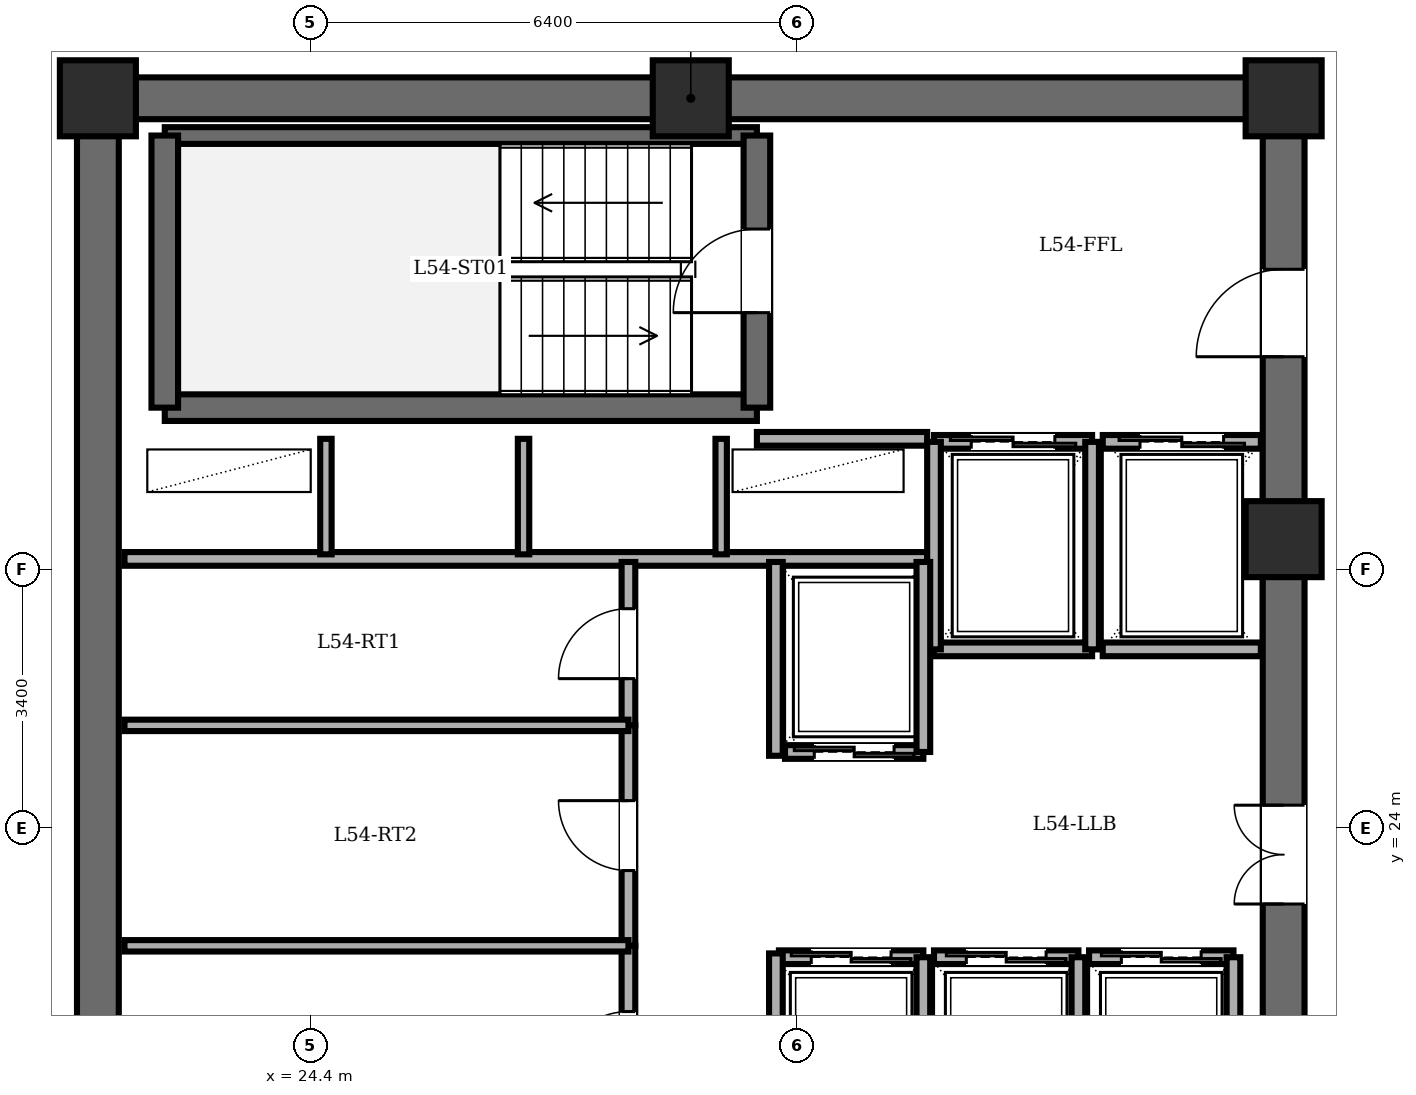
"""IFC4 building model, lengths in metres.
Left out: names, types, materials, properties, quantities, classifications, styles, units other than length and angle.
Written with IfcOpenShell. Run it as: python <this file> out.ifc"""

import sys

from ifc_helpers import new_model, si_unit, direction, frame, frame_2d, origin, origin_2d, place, context, subcontext, project, spatial, rectangle, extrude, element, fill, save


model = new_model("IFC4")
c1 = context("Model", 3, precision=1e-05, world=origin(), true_north=direction((0.0, 1.0)))
c2 = subcontext(c1, "Body", "Model", "MODEL_VIEW")
j1 = project(units=[si_unit("LENGTHUNIT", "METRE"), si_unit("PLANEANGLEUNIT", "RADIAN")], contexts=[c1])
p1 = place(None, origin())
s1 = spatial("IfcSite", under=j1, at=p1, CompositionType="ELEMENT")
p2 = place(p1, origin())
s2 = spatial("IfcBuilding", under=s1, at=p2, CompositionType="ELEMENT")
p3 = place(p2, frame((0.0, 0.0, 208.5)))
s3 = spatial("IfcBuildingStorey", under=s2, at=p3, CompositionType="ELEMENT", Elevation=208.5)
for number, where, z_axis, x_axis in (
    (1, (37.2, 27.8, 0.0), (0.0, 0.0, 1.0), (1.0, 0.0, 0.0)),
    (2, (37.2, 33.6, 0.0), (0.0, 0.0, 1.0), (1.0, 0.0, 0.0)),
    (3, (29.4, 33.6, 0.0), (0.0, 0.0, 1.0), (1.0, 0.0, 0.0)),
    (4, (21.6, 33.6, 0.0), (0.0, 0.0, 1.0), (1.0, 0.0, 0.0)),
):
    element("IfcColumn", number, at=place(p3, frame(where, z_axis=z_axis, x_axis=x_axis)), inside=s3, PredefinedType="COLUMN", context=c2, shape_type="SweptSolid", body=[
        extrude(rectangle(XDim=1.0, YDim=1.0, at=origin_2d()), origin(), (0.0, 0.0, 1.0), 3.6),
    ])
p4 = place(p3, frame((21.6, 14.4, 0.0), z_axis=(0.0, 0.0, 1.0), x_axis=(0.0, 1.0, 0.0)))
e5 = element("IfcWall", 5, at=p4, inside=s3, PredefinedType="SHEAR", context=c2, shape_type="SweptSolid", body=[
    extrude(rectangle(XDim=19.2, YDim=0.55, at=frame_2d((9.6, 0.0))), origin(), (0.0, 0.0, 1.0), 3.4),
])
p5 = place(p3, frame((21.6, 33.6, 0.0), z_axis=(0.0, 0.0, 1.0), x_axis=(1.0, 0.0, 0.0)))
e6 = element("IfcWall", 6, at=p5, inside=s3, PredefinedType="SHEAR", context=c2, shape_type="SweptSolid", body=[
    extrude(rectangle(XDim=15.6, YDim=0.55, at=frame_2d((7.8, 0.0))), origin(), (0.0, 0.0, 1.0), 3.4),
])
p6 = place(p3, frame((37.2, 14.4, 0.0), z_axis=(0.0, 0.0, 1.0), x_axis=(0.0, 1.0, 0.0)))
e7 = element("IfcWall", 7, at=p6, inside=s3, PredefinedType="SHEAR", context=c2, shape_type="SweptSolid", body=[
    extrude(rectangle(XDim=19.2, YDim=0.55, at=frame_2d((9.6, 0.0))), origin(), (0.0, 0.0, 1.0), 3.4),
])
p7 = place(p6, frame((15.8, 0.0, 0.0)))
e8 = element("IfcOpeningElement", 8, at=p7, cuts=e7, PredefinedType="OPENING", context=c2, shape_type="SweptSolid", body=[
    extrude(rectangle(XDim=1.15, YDim=2.15, at=frame_2d((0.575, 1.075))), frame((0.0, 0.285, 0.0), z_axis=(0.0, -1.0, 0.0), x_axis=(1.0, 0.0, 0.0)), (0.0, 0.0, 1.0), 0.57),
])
p8 = place(p6, frame((3.6, 0.0, 0.0)))
e9 = element("IfcOpeningElement", 9, at=p8, cuts=e7, PredefinedType="OPENING", context=c2, shape_type="SweptSolid", body=[
    extrude(rectangle(XDim=1.1, YDim=2.15, at=frame_2d((0.55, 1.075))), frame((0.0, 0.285, 0.0), z_axis=(0.0, -1.0, 0.0), x_axis=(1.0, 0.0, 0.0)), (0.0, 0.0, 1.0), 0.57),
])
p9 = place(p6, frame((8.6, 0.0, 0.0)))
e10 = element("IfcOpeningElement", 10, at=p9, cuts=e7, PredefinedType="OPENING", context=c2, shape_type="SweptSolid", body=[
    extrude(rectangle(XDim=1.3, YDim=2.2, at=frame_2d((0.65, 1.1))), frame((0.0, 0.285, 0.0), z_axis=(0.0, -1.0, 0.0), x_axis=(1.0, 0.0, 0.0)), (0.0, 0.0, 1.0), 0.57),
])
p10 = place(p3, frame((22.48, 29.53, 0.0), z_axis=(0.0, 0.0, 1.0), x_axis=(1.0, 0.0, 0.0)))
e11 = element("IfcWall", 11, at=p10, inside=s3, PredefinedType="SOLIDWALL", context=c2, shape_type="SweptSolid", body=[
    extrude(rectangle(XDim=7.79, YDim=0.35, at=frame_2d((3.895, 0.0))), origin(), (0.0, 0.0, 1.0), 3.4),
])
p11 = place(p3, frame((22.48, 33.11, 0.0), z_axis=(0.0, 0.0, 1.0), x_axis=(1.0, 0.0, 0.0)))
e12 = element("IfcWall", 12, at=p11, inside=s3, PredefinedType="PARTITIONING", context=c2, shape_type="SweptSolid", body=[
    extrude(rectangle(XDim=7.79, YDim=0.22, at=frame_2d((3.895, 0.0))), origin(), (0.0, 0.0, 1.0), 3.4),
])
p12 = place(p3, frame((22.48, 29.53, 0.0), z_axis=(0.0, 0.0, 1.0), x_axis=(0.0, 1.0, 0.0)))
e13 = element("IfcWall", 13, at=p12, inside=s3, PredefinedType="SOLIDWALL", context=c2, shape_type="SweptSolid", body=[
    extrude(rectangle(XDim=3.58, YDim=0.35, at=frame_2d((1.79, 0.0))), origin(), (0.0, 0.0, 1.0), 3.4),
])
p13 = place(p3, frame((30.27, 29.53, 0.0), z_axis=(0.0, 0.0, 1.0), x_axis=(0.0, 1.0, 0.0)))
e14 = element("IfcWall", 14, at=p13, inside=s3, PredefinedType="SOLIDWALL", context=c2, shape_type="SweptSolid", body=[
    extrude(rectangle(XDim=3.58, YDim=0.35, at=frame_2d((1.79, 0.0))), origin(), (0.0, 0.0, 1.0), 3.4),
])
p14 = place(p13, frame((1.25, 0.0, 0.0)))
e15 = element("IfcOpeningElement", 15, at=p14, cuts=e14, PredefinedType="OPENING", context=c2, shape_type="SweptSolid", body=[
    extrude(rectangle(XDim=1.1, YDim=2.15, at=frame_2d((0.55, 1.075))), frame((0.0, 0.185, 0.0), z_axis=(0.0, -1.0, 0.0), x_axis=(1.0, 0.0, 0.0)), (0.0, 0.0, 1.0), 0.37),
])
p15 = place(p3, frame((30.27, 29.12, 0.0), z_axis=(0.0, 0.0, 1.0), x_axis=(1.0, 0.0, 0.0)))
e16 = element("IfcWall", 16, at=p15, inside=s3, PredefinedType="PARTITIONING", context=c2, shape_type="SweptSolid", body=[
    extrude(rectangle(XDim=2.24, YDim=0.18, at=frame_2d((1.12, 0.0))), origin(), (0.0, 0.0, 1.0), 3.4),
])
p16 = place(p3, frame((21.95, 27.54, 0.0), z_axis=(0.0, 0.0, 1.0), x_axis=(1.0, 0.0, 0.0)))
e17 = element("IfcWall", 17, at=p16, inside=s3, PredefinedType="PARTITIONING", context=c2, shape_type="SweptSolid", body=[
    extrude(rectangle(XDim=10.56, YDim=0.18, at=frame_2d((5.28, 0.0))), origin(), (0.0, 0.0, 1.0), 3.4),
])
for number, where, z_axis, x_axis in (
    (18, (24.6, 27.6, 0.0), (0.0, 0.0, 1.0), (0.0, 1.0, 0.0)),
    (19, (27.2, 27.6, 0.0), (0.0, 0.0, 1.0), (0.0, 1.0, 0.0)),
    (20, (29.8, 27.6, 0.0), (0.0, 0.0, 1.0), (0.0, 1.0, 0.0)),
):
    element("IfcWall", number, at=place(p3, frame(where, z_axis=z_axis, x_axis=x_axis)), inside=s3, PredefinedType="PARTITIONING", context=c2, shape_type="SweptSolid", body=[
        extrude(rectangle(XDim=1.52, YDim=0.15, at=frame_2d((0.76, 0.0))), origin(), (0.0, 0.0, 1.0), 3.4),
    ])
p17 = place(p3, frame((32.6, 29.08, 0.0), z_axis=(0.0, 0.0, 1.0), x_axis=(1.0, 0.0, 0.0)))
e21 = element("IfcWall", 21, at=p17, inside=s3, PredefinedType="PARTITIONING", context=c2, shape_type="SweptSolid", body=[
    extrude(rectangle(XDim=2.08, YDim=0.18, at=frame_2d((1.04, 0.0))), origin(), (0.0, 0.0, 1.0), 3.4),
])
p18 = place(p17, frame((0.49, 0.0, 0.0)))
e22 = element("IfcOpeningElement", 22, at=p18, cuts=e21, PredefinedType="OPENING", context=c2, shape_type="SweptSolid", body=[
    extrude(rectangle(XDim=1.1, YDim=2.2, at=frame_2d((0.55, 1.1))), frame((0.0, 0.1, 0.0), z_axis=(0.0, -1.0, 0.0), x_axis=(1.0, 0.0, 0.0)), (0.0, 0.0, 1.0), 0.2),
])
p19 = place(p3, frame((34.68, 26.35, 0.0), z_axis=(0.0, 0.0, 1.0), x_axis=(-1.0, 0.0, 0.0)))
e23 = element("IfcWall", 23, at=p19, inside=s3, PredefinedType="PARTITIONING", context=c2, shape_type="SweptSolid", body=[
    extrude(rectangle(XDim=2.08, YDim=0.18, at=frame_2d((1.04, 0.0))), origin(), (0.0, 0.0, 1.0), 3.4),
])
for number, where, z_axis, x_axis in (
    (24, (34.68, 26.35, 0.0), (0.0, 0.0, 1.0), (0.0, 1.0, 0.0)),
    (25, (32.6, 29.08, 0.0), (0.0, 0.0, 1.0), (0.0, -1.0, 0.0)),
):
    element("IfcWall", number, at=place(p3, frame(where, z_axis=z_axis, x_axis=x_axis)), inside=s3, PredefinedType="PARTITIONING", context=c2, shape_type="SweptSolid", body=[
        extrude(rectangle(XDim=2.73, YDim=0.18, at=frame_2d((1.365, 0.0))), origin(), (0.0, 0.0, 1.0), 3.4),
    ])
p20 = place(p3, frame((34.82, 29.08, 0.0), z_axis=(0.0, 0.0, 1.0), x_axis=(1.0, 0.0, 0.0)))
e26 = element("IfcWall", 26, at=p20, inside=s3, PredefinedType="PARTITIONING", context=c2, shape_type="SweptSolid", body=[
    extrude(rectangle(XDim=2.08, YDim=0.18, at=frame_2d((1.04, 0.0))), origin(), (0.0, 0.0, 1.0), 3.4),
])
p21 = place(p20, frame((0.49, 0.0, 0.0)))
e27 = element("IfcOpeningElement", 27, at=p21, cuts=e26, PredefinedType="OPENING", context=c2, shape_type="SweptSolid", body=[
    extrude(rectangle(XDim=1.1, YDim=2.2, at=frame_2d((0.55, 1.1))), frame((0.0, 0.1, 0.0), z_axis=(0.0, -1.0, 0.0), x_axis=(1.0, 0.0, 0.0)), (0.0, 0.0, 1.0), 0.2),
])
p22 = place(p3, frame((36.9, 26.35, 0.0), z_axis=(0.0, 0.0, 1.0), x_axis=(-1.0, 0.0, 0.0)))
e28 = element("IfcWall", 28, at=p22, inside=s3, PredefinedType="PARTITIONING", context=c2, shape_type="SweptSolid", body=[
    extrude(rectangle(XDim=2.08, YDim=0.18, at=frame_2d((1.04, 0.0))), origin(), (0.0, 0.0, 1.0), 3.4),
])
p23 = place(p3, frame((32.46, 25.0, 0.0), z_axis=(0.0, 0.0, 1.0), x_axis=(-1.0, 0.0, 0.0)))
e29 = element("IfcWall", 29, at=p23, inside=s3, PredefinedType="PARTITIONING", context=c2, shape_type="SweptSolid", body=[
    extrude(rectangle(XDim=1.82, YDim=0.18, at=frame_2d((0.91, 0.0))), origin(), (0.0, 0.0, 1.0), 3.4),
])
p24 = place(p23, frame((0.385, 0.0, 0.0)))
e30 = element("IfcOpeningElement", 30, at=p24, cuts=e29, PredefinedType="OPENING", context=c2, shape_type="SweptSolid", body=[
    extrude(rectangle(XDim=1.05, YDim=2.2, at=frame_2d((0.525, 1.1))), frame((0.0, 0.1, 0.0), z_axis=(0.0, -1.0, 0.0), x_axis=(1.0, 0.0, 0.0)), (0.0, 0.0, 1.0), 0.2),
])
p25 = place(p3, frame((32.46, 25.0, 0.0), z_axis=(0.0, 0.0, 1.0), x_axis=(0.0, 1.0, 0.0)))
e31 = element("IfcWall", 31, at=p25, inside=s3, PredefinedType="PARTITIONING", context=c2, shape_type="SweptSolid", body=[
    extrude(rectangle(XDim=2.5, YDim=0.18, at=frame_2d((1.25, 0.0))), origin(), (0.0, 0.0, 1.0), 3.4),
])
p26 = place(p3, frame((30.56, 22.3, 0.0), z_axis=(0.0, 0.0, 1.0), x_axis=(1.0, 0.0, 0.0)))
e32 = element("IfcWall", 32, at=p26, inside=s3, PredefinedType="PARTITIONING", context=c2, shape_type="SweptSolid", body=[
    extrude(rectangle(XDim=1.9, YDim=0.18, at=frame_2d((0.95, 0.0))), origin(), (0.0, 0.0, 1.0), 3.4),
])
p27 = place(p26, frame((0.425, 0.0, 0.0)))
e33 = element("IfcOpeningElement", 33, at=p27, cuts=e32, PredefinedType="OPENING", context=c2, shape_type="SweptSolid", body=[
    extrude(rectangle(XDim=1.05, YDim=2.2, at=frame_2d((0.525, 1.1))), frame((0.0, 0.1, 0.0), z_axis=(0.0, -1.0, 0.0), x_axis=(1.0, 0.0, 0.0)), (0.0, 0.0, 1.0), 0.2),
])
p28 = place(p3, frame((32.46, 19.8, 0.0), z_axis=(0.0, 0.0, 1.0), x_axis=(0.0, 1.0, 0.0)))
e34 = element("IfcWall", 34, at=p28, inside=s3, PredefinedType="PARTITIONING", context=c2, shape_type="SweptSolid", body=[
    extrude(rectangle(XDim=2.5, YDim=0.18, at=frame_2d((1.25, 0.0))), origin(), (0.0, 0.0, 1.0), 3.4),
])
p29 = place(p3, frame((32.6, 22.3, 0.0), z_axis=(0.0, 0.0, 1.0), x_axis=(1.0, 0.0, 0.0)))
e35 = element("IfcWall", 35, at=p29, inside=s3, PredefinedType="PARTITIONING", context=c2, shape_type="SweptSolid", body=[
    extrude(rectangle(XDim=1.9, YDim=0.18, at=frame_2d((0.95, 0.0))), origin(), (0.0, 0.0, 1.0), 3.4),
])
p30 = place(p29, frame((0.425, 0.0, 0.0)))
e36 = element("IfcOpeningElement", 36, at=p30, cuts=e35, PredefinedType="OPENING", context=c2, shape_type="SweptSolid", body=[
    extrude(rectangle(XDim=1.05, YDim=2.2, at=frame_2d((0.525, 1.1))), frame((0.0, 0.1, 0.0), z_axis=(0.0, -1.0, 0.0), x_axis=(1.0, 0.0, 0.0)), (0.0, 0.0, 1.0), 0.2),
])
p31 = place(p3, frame((34.5, 19.8, 0.0), z_axis=(0.0, 0.0, 1.0), x_axis=(0.0, 1.0, 0.0)))
e37 = element("IfcWall", 37, at=p31, inside=s3, PredefinedType="PARTITIONING", context=c2, shape_type="SweptSolid", body=[
    extrude(rectangle(XDim=2.5, YDim=0.18, at=frame_2d((1.25, 0.0))), origin(), (0.0, 0.0, 1.0), 3.4),
])
p32 = place(p3, frame((34.64, 22.3, 0.0), z_axis=(0.0, 0.0, 1.0), x_axis=(1.0, 0.0, 0.0)))
e38 = element("IfcWall", 38, at=p32, inside=s3, PredefinedType="PARTITIONING", context=c2, shape_type="SweptSolid", body=[
    extrude(rectangle(XDim=1.9, YDim=0.18, at=frame_2d((0.95, 0.0))), origin(), (0.0, 0.0, 1.0), 3.4),
])
p33 = place(p32, frame((0.425, 0.0, 0.0)))
e39 = element("IfcOpeningElement", 39, at=p33, cuts=e38, PredefinedType="OPENING", context=c2, shape_type="SweptSolid", body=[
    extrude(rectangle(XDim=1.05, YDim=2.2, at=frame_2d((0.525, 1.1))), frame((0.0, 0.1, 0.0), z_axis=(0.0, -1.0, 0.0), x_axis=(1.0, 0.0, 0.0)), (0.0, 0.0, 1.0), 0.2),
])
p34 = place(p3, frame((36.54, 19.8, 0.0), z_axis=(0.0, 0.0, 1.0), x_axis=(0.0, 1.0, 0.0)))
e40 = element("IfcWall", 40, at=p34, inside=s3, PredefinedType="PARTITIONING", context=c2, shape_type="SweptSolid", body=[
    extrude(rectangle(XDim=2.5, YDim=0.18, at=frame_2d((1.25, 0.0))), origin(), (0.0, 0.0, 1.0), 3.4),
])
for number, where, z_axis, x_axis in (
    (41, (30.52, 24.95, 0.0), (0.0, 0.0, 1.0), (0.0, 1.0, 0.0)),
    (42, (30.52, 19.8, 0.0), (0.0, 0.0, 1.0), (0.0, 1.0, 0.0)),
):
    element("IfcWall", number, at=place(p3, frame(where, z_axis=z_axis, x_axis=x_axis)), inside=s3, PredefinedType="PARTITIONING", context=c2, shape_type="SweptSolid", body=[
        extrude(rectangle(XDim=2.55, YDim=0.18, at=frame_2d((1.275, 0.0))), origin(), (0.0, 0.0, 1.0), 3.4),
    ])
p35 = place(p3, frame((28.58, 25.35, 0.0), z_axis=(0.0, 0.0, 1.0), x_axis=(0.0, 1.0, 0.0)))
e43 = element("IfcWall", 43, at=p35, inside=s3, PredefinedType="PARTITIONING", context=c2, shape_type="SweptSolid", body=[
    extrude(rectangle(XDim=2.15, YDim=0.18, at=frame_2d((1.075, 0.0))), origin(), (0.0, 0.0, 1.0), 3.4),
])
p36 = place(p35, frame((0.615, 0.0, 0.0)))
e44 = element("IfcOpeningElement", 44, at=p36, cuts=e43, PredefinedType="OPENING", context=c2, shape_type="SweptSolid", body=[
    extrude(rectangle(XDim=0.92, YDim=2.1, at=frame_2d((0.46, 1.05))), frame((0.0, 0.1, 0.0), z_axis=(0.0, -1.0, 0.0), x_axis=(1.0, 0.0, 0.0)), (0.0, 0.0, 1.0), 0.2),
])
p37 = place(p3, frame((28.58, 22.45, 0.0), z_axis=(0.0, 0.0, 1.0), x_axis=(0.0, 1.0, 0.0)))
e45 = element("IfcWall", 45, at=p37, inside=s3, PredefinedType="PARTITIONING", context=c2, shape_type="SweptSolid", body=[
    extrude(rectangle(XDim=2.9, YDim=0.18, at=frame_2d((1.45, 0.0))), origin(), (0.0, 0.0, 1.0), 3.4),
])
p38 = place(p37, frame((0.99, 0.0, 0.0)))
e46 = element("IfcOpeningElement", 46, at=p38, cuts=e45, PredefinedType="OPENING", context=c2, shape_type="SweptSolid", body=[
    extrude(rectangle(XDim=0.92, YDim=2.1, at=frame_2d((0.46, 1.05))), frame((0.0, 0.1, 0.0), z_axis=(0.0, -1.0, 0.0), x_axis=(1.0, 0.0, 0.0)), (0.0, 0.0, 1.0), 0.2),
])
p39 = place(p3, frame((28.58, 19.8, 0.0), z_axis=(0.0, 0.0, 1.0), x_axis=(0.0, 1.0, 0.0)))
e47 = element("IfcWall", 47, at=p39, inside=s3, PredefinedType="PARTITIONING", context=c2, shape_type="SweptSolid", body=[
    extrude(rectangle(XDim=2.65, YDim=0.18, at=frame_2d((1.325, 0.0))), origin(), (0.0, 0.0, 1.0), 3.4),
])
p40 = place(p39, frame((0.865, 0.0, 0.0)))
e48 = element("IfcOpeningElement", 48, at=p40, cuts=e47, PredefinedType="OPENING", context=c2, shape_type="SweptSolid", body=[
    extrude(rectangle(XDim=0.92, YDim=2.1, at=frame_2d((0.46, 1.05))), frame((0.0, 0.1, 0.0), z_axis=(0.0, -1.0, 0.0), x_axis=(1.0, 0.0, 0.0)), (0.0, 0.0, 1.0), 0.2),
])
for number, where, z_axis, x_axis in (
    (49, (21.95, 25.35, 0.0), (0.0, 0.0, 1.0), (1.0, 0.0, 0.0)),
    (50, (21.95, 22.45, 0.0), (0.0, 0.0, 1.0), (1.0, 0.0, 0.0)),
):
    element("IfcWall", number, at=place(p3, frame(where, z_axis=z_axis, x_axis=x_axis)), inside=s3, PredefinedType="PARTITIONING", context=c2, shape_type="SweptSolid", body=[
        extrude(rectangle(XDim=6.63, YDim=0.15, at=frame_2d((3.315, 0.0))), origin(), (0.0, 0.0, 1.0), 3.4),
    ])
p41 = place(p14, origin())
e51 = element("IfcDoor", 51, at=p41, inside=s3, OperationType="SINGLE_SWING_LEFT", PredefinedType="DOOR", context=c2, shape_type="SweptSolid", body=[
    extrude(rectangle(XDim=1.1, YDim=2.15, at=frame_2d((0.55, 1.075))), frame((0.0, 0.025, 0.0), z_axis=(0.0, -1.0, 0.0), x_axis=(1.0, 0.0, 0.0)), (0.0, 0.0, 1.0), 0.05),
])
fill(e15, e51)
p42 = place(p7, origin())
e52 = element("IfcDoor", 52, at=p42, inside=s3, OperationType="SINGLE_SWING_LEFT", PredefinedType="DOOR", context=c2, shape_type="SweptSolid", body=[
    extrude(rectangle(XDim=1.15, YDim=2.15, at=frame_2d((0.575, 1.075))), frame((0.0, 0.025, 0.0), z_axis=(0.0, -1.0, 0.0), x_axis=(1.0, 0.0, 0.0)), (0.0, 0.0, 1.0), 0.05),
])
fill(e8, e52)
p43 = place(p18, origin())
e53 = element("IfcDoor", 53, at=p43, inside=s3, OperationType="DOUBLE_DOOR_SLIDING", PredefinedType="DOOR", context=c2, shape_type="SweptSolid", body=[
    extrude(rectangle(XDim=1.1, YDim=2.2, at=frame_2d((0.55, 1.1))), frame((0.0, 0.025, 0.0), z_axis=(0.0, -1.0, 0.0), x_axis=(1.0, 0.0, 0.0)), (0.0, 0.0, 1.0), 0.05),
])
fill(e22, e53)
p44 = place(p21, origin())
e54 = element("IfcDoor", 54, at=p44, inside=s3, OperationType="DOUBLE_DOOR_SLIDING", PredefinedType="DOOR", context=c2, shape_type="SweptSolid", body=[
    extrude(rectangle(XDim=1.1, YDim=2.2, at=frame_2d((0.55, 1.1))), frame((0.0, 0.025, 0.0), z_axis=(0.0, -1.0, 0.0), x_axis=(1.0, 0.0, 0.0)), (0.0, 0.0, 1.0), 0.05),
])
fill(e27, e54)
p45 = place(p24, origin())
e55 = element("IfcDoor", 55, at=p45, inside=s3, OperationType="DOUBLE_DOOR_SLIDING", PredefinedType="DOOR", context=c2, shape_type="SweptSolid", body=[
    extrude(rectangle(XDim=1.05, YDim=2.2, at=frame_2d((0.525, 1.1))), frame((0.0, 0.025, 0.0), z_axis=(0.0, -1.0, 0.0), x_axis=(1.0, 0.0, 0.0)), (0.0, 0.0, 1.0), 0.05),
])
fill(e30, e55)
p46 = place(p27, origin())
e56 = element("IfcDoor", 56, at=p46, inside=s3, OperationType="DOUBLE_DOOR_SLIDING", PredefinedType="DOOR", context=c2, shape_type="SweptSolid", body=[
    extrude(rectangle(XDim=1.05, YDim=2.2, at=frame_2d((0.525, 1.1))), frame((0.0, 0.025, 0.0), z_axis=(0.0, -1.0, 0.0), x_axis=(1.0, 0.0, 0.0)), (0.0, 0.0, 1.0), 0.05),
])
fill(e33, e56)
p47 = place(p30, origin())
e57 = element("IfcDoor", 57, at=p47, inside=s3, OperationType="DOUBLE_DOOR_SLIDING", PredefinedType="DOOR", context=c2, shape_type="SweptSolid", body=[
    extrude(rectangle(XDim=1.05, YDim=2.2, at=frame_2d((0.525, 1.1))), frame((0.0, 0.025, 0.0), z_axis=(0.0, -1.0, 0.0), x_axis=(1.0, 0.0, 0.0)), (0.0, 0.0, 1.0), 0.05),
])
fill(e36, e57)
p48 = place(p33, origin())
e58 = element("IfcDoor", 58, at=p48, inside=s3, OperationType="DOUBLE_DOOR_SLIDING", PredefinedType="DOOR", context=c2, shape_type="SweptSolid", body=[
    extrude(rectangle(XDim=1.05, YDim=2.2, at=frame_2d((0.525, 1.1))), frame((0.0, 0.025, 0.0), z_axis=(0.0, -1.0, 0.0), x_axis=(1.0, 0.0, 0.0)), (0.0, 0.0, 1.0), 0.05),
])
fill(e39, e58)
p49 = place(p36, origin())
e59 = element("IfcDoor", 59, at=p49, inside=s3, OperationType="SINGLE_SWING_LEFT", PredefinedType="DOOR", context=c2, shape_type="SweptSolid", body=[
    extrude(rectangle(XDim=0.92, YDim=2.1, at=frame_2d((0.46, 1.05))), frame((0.0, 0.025, 0.0), z_axis=(0.0, -1.0, 0.0), x_axis=(1.0, 0.0, 0.0)), (0.0, 0.0, 1.0), 0.05),
])
fill(e44, e59)
p50 = place(p38, origin())
e60 = element("IfcDoor", 60, at=p50, inside=s3, OperationType="SINGLE_SWING_RIGHT", PredefinedType="DOOR", context=c2, shape_type="SweptSolid", body=[
    extrude(rectangle(XDim=0.92, YDim=2.1, at=frame_2d((0.46, 1.05))), frame((0.0, 0.025, 0.0), z_axis=(0.0, -1.0, 0.0), x_axis=(1.0, 0.0, 0.0)), (0.0, 0.0, 1.0), 0.05),
])
fill(e46, e60)
p51 = place(p40, origin())
e61 = element("IfcDoor", 61, at=p51, inside=s3, OperationType="SINGLE_SWING_LEFT", PredefinedType="DOOR", context=c2, shape_type="SweptSolid", body=[
    extrude(rectangle(XDim=0.92, YDim=2.1, at=frame_2d((0.46, 1.05))), frame((0.0, 0.025, 0.0), z_axis=(0.0, -1.0, 0.0), x_axis=(1.0, 0.0, 0.0)), (0.0, 0.0, 1.0), 0.05),
])
fill(e48, e61)
p52 = place(p9, origin())
e62 = element("IfcDoor", 62, at=p52, inside=s3, OperationType="DOUBLE_DOOR_SINGLE_SWING", PredefinedType="DOOR", context=c2, shape_type="SweptSolid", body=[
    extrude(rectangle(XDim=1.3, YDim=2.2, at=frame_2d((0.65, 1.1))), frame((0.0, 0.025, 0.0), z_axis=(0.0, -1.0, 0.0), x_axis=(1.0, 0.0, 0.0)), (0.0, 0.0, 1.0), 0.05),
])
fill(e10, e62)
save(model, sys.argv[1])
